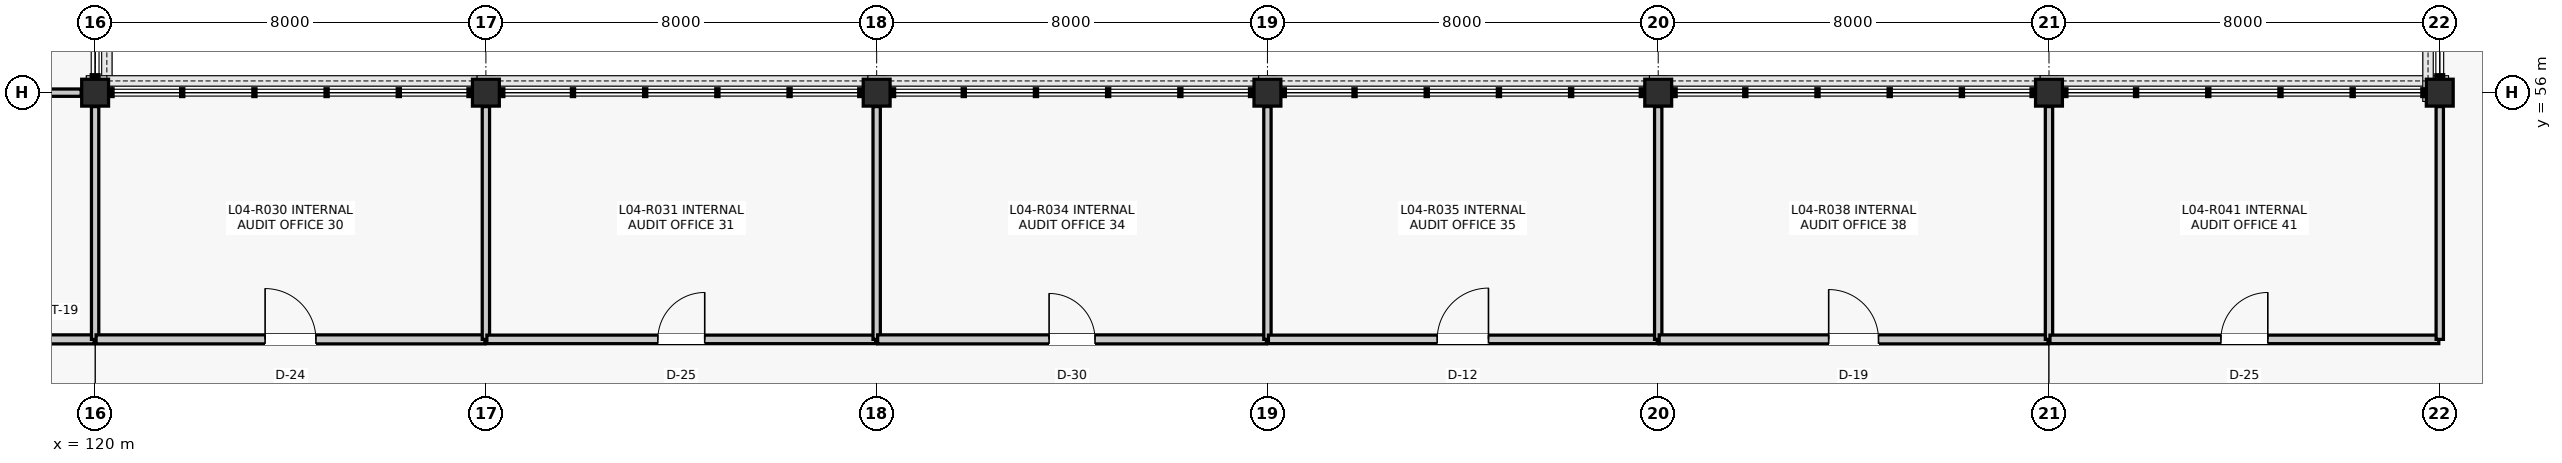
"""IFC4 building model, lengths in metres.
Left out: names, types, materials, properties, quantities, classifications, styles, units other than length and angle.
Written with IfcOpenShell. Run it as: python <this file> out.ifc"""

import sys

from ifc_helpers import new_model, si_unit, direction, frame, frame_2d, origin, origin_2d, place, context, subcontext, project, spatial, rectangle, extrude, element, fill, save


model = new_model("IFC4")
c1 = context("Model", 3, precision=1e-05, world=origin(), true_north=direction((0.0, 1.0)))
c2 = subcontext(c1, "Body", "Model", "MODEL_VIEW")
j1 = project(units=[si_unit("LENGTHUNIT", "METRE"), si_unit("PLANEANGLEUNIT", "RADIAN")], contexts=[c1])
p1 = place(None, origin())
s1 = spatial("IfcSite", under=j1, at=p1, CompositionType="ELEMENT")
p2 = place(p1, origin())
s2 = spatial("IfcBuilding", under=s1, at=p2, CompositionType="ELEMENT")
p3 = place(p2, frame((0.0, 0.0, 17.82)))
s3 = spatial("IfcBuildingStorey", under=s2, at=p3, CompositionType="ELEMENT", Elevation=17.82)
for number, where, z_axis, x_axis in (
    (1, (120.0, 56.0, 0.0), (0.0, 0.0, 1.0), (1.0, 0.0, 0.0)),
    (2, (128.0, 56.0, 0.0), (0.0, 0.0, 1.0), (1.0, 0.0, 0.0)),
    (3, (136.0, 56.0, 0.0), (0.0, 0.0, 1.0), (1.0, 0.0, 0.0)),
    (4, (144.0, 56.0, 0.0), (0.0, 0.0, 1.0), (1.0, 0.0, 0.0)),
    (5, (152.0, 56.0, 0.0), (0.0, 0.0, 1.0), (1.0, 0.0, 0.0)),
    (6, (160.0, 56.0, 0.0), (0.0, 0.0, 1.0), (1.0, 0.0, 0.0)),
    (7, (168.0, 56.0, 0.0), (0.0, 0.0, 1.0), (1.0, 0.0, 0.0)),
):
    element("IfcColumn", number, at=place(p3, frame(where, z_axis=z_axis, x_axis=x_axis)), inside=s3, PredefinedType="COLUMN", context=c2, shape_type="SweptSolid", body=[
        extrude(rectangle(XDim=0.55, YDim=0.55, at=origin_2d()), origin(), (0.0, 0.0, 1.0), 3.96),
    ])
p4 = place(p3, frame((114.9, 50.95, 0.0), z_axis=(0.0, 0.0, 1.0), x_axis=(1.0, 0.0, 0.0)))
e8 = element("IfcWall", 8, at=p4, inside=s3, PredefinedType="PARTITIONING", context=c2, shape_type="SweptSolid", body=[
    extrude(rectangle(XDim=5.08, YDim=0.185, at=frame_2d((2.54, 0.0))), origin(), (0.0, 0.0, 1.0), 3.232),
])
p5 = place(p4, frame((2.03, 0.0, 0.0)))
e9 = element("IfcOpeningElement", 9, at=p5, cuts=e8, PredefinedType="OPENING", context=c2, shape_type="SweptSolid", body=[
    extrude(rectangle(XDim=1.02, YDim=2.2, at=frame_2d((0.51, 1.1))), frame((0.0, 0.103, 0.0), z_axis=(0.0, -1.0, 0.0), x_axis=(1.0, 0.0, 0.0)), (0.0, 0.0, 1.0), 0.205),
])
p6 = place(p3, frame((114.95, 56.0, 0.0), z_axis=(0.0, 0.0, 1.0), x_axis=(1.0, 0.0, 0.0)))
e10 = element("IfcWall", 10, at=p6, inside=s3, PredefinedType="PARTITIONING", context=c2, shape_type="SweptSolid", body=[
    extrude(rectangle(XDim=4.765, YDim=0.15, at=frame_2d((2.383, 0.0))), origin(), (0.0, 0.0, 1.0), 3.238),
])
p7 = place(p3, frame((120.0, 50.95, 0.0), z_axis=(0.0, 0.0, 1.0), x_axis=(0.0, 1.0, 0.0)))
e11 = element("IfcWall", 11, at=p7, inside=s3, PredefinedType="PARTITIONING", context=c2, shape_type="SweptSolid", body=[
    extrude(rectangle(XDim=4.765, YDim=0.15, at=frame_2d((2.383, 0.0))), origin(), (0.0, 0.0, 1.0), 3.232),
])
p8 = place(p3, frame((120.02, 50.95, 0.0), z_axis=(0.0, 0.0, 1.0), x_axis=(1.0, 0.0, 0.0)))
e12 = element("IfcWall", 12, at=p8, inside=s3, PredefinedType="PARTITIONING", context=c2, shape_type="SweptSolid", body=[
    extrude(rectangle(XDim=7.96, YDim=0.185, at=frame_2d((3.98, 0.0))), origin(), (0.0, 0.0, 1.0), 3.232),
])
p9 = place(p8, frame((3.46, 0.0, 0.0)))
e13 = element("IfcOpeningElement", 13, at=p9, cuts=e12, PredefinedType="OPENING", context=c2, shape_type="SweptSolid", body=[
    extrude(rectangle(XDim=1.04, YDim=2.18, at=frame_2d((0.52, 1.09))), frame((0.0, 0.103, 0.0), z_axis=(0.0, -1.0, 0.0), x_axis=(1.0, 0.0, 0.0)), (0.0, 0.0, 1.0), 0.205),
])
p10 = place(p3, frame((128.0, 50.95, 0.0), z_axis=(0.0, 0.0, 1.0), x_axis=(0.0, 1.0, 0.0)))
e14 = element("IfcWall", 14, at=p10, inside=s3, PredefinedType="PARTITIONING", context=c2, shape_type="SweptSolid", body=[
    extrude(rectangle(XDim=4.765, YDim=0.15, at=frame_2d((2.383, 0.0))), origin(), (0.0, 0.0, 1.0), 3.238),
])
p11 = place(p3, frame((128.02, 50.95, 0.0), z_axis=(0.0, 0.0, 1.0), x_axis=(1.0, 0.0, 0.0)))
e15 = element("IfcWall", 15, at=p11, inside=s3, PredefinedType="PARTITIONING", context=c2, shape_type="SweptSolid", body=[
    extrude(rectangle(XDim=7.96, YDim=0.175, at=frame_2d((3.98, 0.0))), origin(), (0.0, 0.0, 1.0), 3.238),
])
p12 = place(p11, frame((3.5, 0.0, 0.0)))
e16 = element("IfcOpeningElement", 16, at=p12, cuts=e15, PredefinedType="OPENING", context=c2, shape_type="SweptSolid", body=[
    extrude(rectangle(XDim=0.96, YDim=2.14, at=frame_2d((0.48, 1.07))), frame((0.0, 0.097, 0.0), z_axis=(0.0, -1.0, 0.0), x_axis=(1.0, 0.0, 0.0)), (0.0, 0.0, 1.0), 0.195),
])
p13 = place(p3, frame((136.0, 50.95, 0.0), z_axis=(0.0, 0.0, 1.0), x_axis=(0.0, 1.0, 0.0)))
e17 = element("IfcWall", 17, at=p13, inside=s3, PredefinedType="PARTITIONING", context=c2, shape_type="SweptSolid", body=[
    extrude(rectangle(XDim=4.765, YDim=0.15, at=frame_2d((2.383, 0.0))), origin(), (0.0, 0.0, 1.0), 3.437),
])
p14 = place(p3, frame((136.02, 50.95, 0.0), z_axis=(0.0, 0.0, 1.0), x_axis=(1.0, 0.0, 0.0)))
e18 = element("IfcWall", 18, at=p14, inside=s3, PredefinedType="PARTITIONING", context=c2, shape_type="SweptSolid", body=[
    extrude(rectangle(XDim=7.96, YDim=0.185, at=frame_2d((3.98, 0.0))), origin(), (0.0, 0.0, 1.0), 3.232),
])
p15 = place(p14, frame((3.51, 0.0, 0.0)))
e19 = element("IfcOpeningElement", 19, at=p15, cuts=e18, PredefinedType="OPENING", context=c2, shape_type="SweptSolid", body=[
    extrude(rectangle(XDim=0.94, YDim=2.12, at=frame_2d((0.47, 1.06))), frame((0.0, 0.103, 0.0), z_axis=(0.0, -1.0, 0.0), x_axis=(1.0, 0.0, 0.0)), (0.0, 0.0, 1.0), 0.205),
])
p16 = place(p3, frame((144.0, 50.95, 0.0), z_axis=(0.0, 0.0, 1.0), x_axis=(0.0, 1.0, 0.0)))
e20 = element("IfcWall", 20, at=p16, inside=s3, PredefinedType="PARTITIONING", context=c2, shape_type="SweptSolid", body=[
    extrude(rectangle(XDim=4.765, YDim=0.15, at=frame_2d((2.383, 0.0))), origin(), (0.0, 0.0, 1.0), 3.232),
])
p17 = place(p3, frame((144.02, 50.95, 0.0), z_axis=(0.0, 0.0, 1.0), x_axis=(1.0, 0.0, 0.0)))
e21 = element("IfcWall", 21, at=p17, inside=s3, PredefinedType="PARTITIONING", context=c2, shape_type="SweptSolid", body=[
    extrude(rectangle(XDim=7.96, YDim=0.175, at=frame_2d((3.98, 0.0))), origin(), (0.0, 0.0, 1.0), 3.232),
])
p18 = place(p17, frame((3.455, 0.0, 0.0)))
e22 = element("IfcOpeningElement", 22, at=p18, cuts=e21, PredefinedType="OPENING", context=c2, shape_type="SweptSolid", body=[
    extrude(rectangle(XDim=1.05, YDim=2.15, at=frame_2d((0.525, 1.075))), frame((0.0, 0.097, 0.0), z_axis=(0.0, -1.0, 0.0), x_axis=(1.0, 0.0, 0.0)), (0.0, 0.0, 1.0), 0.195),
])
p19 = place(p3, frame((152.0, 50.95, 0.0), z_axis=(0.0, 0.0, 1.0), x_axis=(0.0, 1.0, 0.0)))
e23 = element("IfcWall", 23, at=p19, inside=s3, PredefinedType="PARTITIONING", context=c2, shape_type="SweptSolid", body=[
    extrude(rectangle(XDim=4.765, YDim=0.15, at=frame_2d((2.383, 0.0))), origin(), (0.0, 0.0, 1.0), 3.238),
])
p20 = place(p3, frame((152.02, 50.95, 0.0), z_axis=(0.0, 0.0, 1.0), x_axis=(1.0, 0.0, 0.0)))
e24 = element("IfcWall", 24, at=p20, inside=s3, PredefinedType="PARTITIONING", context=c2, shape_type="SweptSolid", body=[
    extrude(rectangle(XDim=7.96, YDim=0.185, at=frame_2d((3.98, 0.0))), origin(), (0.0, 0.0, 1.0), 3.238),
])
p21 = place(p20, frame((3.47, 0.0, 0.0)))
e25 = element("IfcOpeningElement", 25, at=p21, cuts=e24, PredefinedType="OPENING", context=c2, shape_type="SweptSolid", body=[
    extrude(rectangle(XDim=1.02, YDim=2.2, at=frame_2d((0.51, 1.1))), frame((0.0, 0.103, 0.0), z_axis=(0.0, -1.0, 0.0), x_axis=(1.0, 0.0, 0.0)), (0.0, 0.0, 1.0), 0.205),
])
p22 = place(p3, frame((160.0, 50.95, 0.0), z_axis=(0.0, 0.0, 1.0), x_axis=(0.0, 1.0, 0.0)))
e26 = element("IfcWall", 26, at=p22, inside=s3, PredefinedType="PARTITIONING", context=c2, shape_type="SweptSolid", body=[
    extrude(rectangle(XDim=4.765, YDim=0.15, at=frame_2d((2.383, 0.0))), origin(), (0.0, 0.0, 1.0), 3.437),
])
p23 = place(p3, frame((160.02, 50.95, 0.0), z_axis=(0.0, 0.0, 1.0), x_axis=(1.0, 0.0, 0.0)))
e27 = element("IfcWall", 27, at=p23, inside=s3, PredefinedType="PARTITIONING", context=c2, shape_type="SweptSolid", body=[
    extrude(rectangle(XDim=7.96, YDim=0.175, at=frame_2d((3.98, 0.0))), origin(), (0.0, 0.0, 1.0), 3.232),
])
p24 = place(p23, frame((3.5, 0.0, 0.0)))
e28 = element("IfcOpeningElement", 28, at=p24, cuts=e27, PredefinedType="OPENING", context=c2, shape_type="SweptSolid", body=[
    extrude(rectangle(XDim=0.96, YDim=2.14, at=frame_2d((0.48, 1.07))), frame((0.0, 0.097, 0.0), z_axis=(0.0, -1.0, 0.0), x_axis=(1.0, 0.0, 0.0)), (0.0, 0.0, 1.0), 0.195),
])
p25 = place(p3, frame((168.0, 50.95, 0.0), z_axis=(0.0, 0.0, 1.0), x_axis=(0.0, 1.0, 0.0)))
e29 = element("IfcWall", 29, at=p25, inside=s3, PredefinedType="PARTITIONING", context=c2, shape_type="SweptSolid", body=[
    extrude(rectangle(XDim=4.765, YDim=0.15, at=frame_2d((2.383, 0.0))), origin(), (0.0, 0.0, 1.0), 3.232),
])
p26 = place(p9, origin())
e30 = element("IfcDoor", 30, at=p26, inside=s3, OperationType="SINGLE_SWING_LEFT", PredefinedType="DOOR", context=c2, shape_type="SweptSolid", body=[
    extrude(rectangle(XDim=1.04, YDim=2.18, at=frame_2d((0.52, 1.09))), frame((0.0, 0.025, 0.0), z_axis=(0.0, -1.0, 0.0), x_axis=(1.0, 0.0, 0.0)), (0.0, 0.0, 1.0), 0.05),
])
fill(e13, e30)
p27 = place(p12, origin())
e31 = element("IfcDoor", 31, at=p27, inside=s3, OperationType="SINGLE_SWING_RIGHT", PredefinedType="DOOR", context=c2, shape_type="SweptSolid", body=[
    extrude(rectangle(XDim=0.96, YDim=2.14, at=frame_2d((0.48, 1.07))), frame((0.0, 0.025, 0.0), z_axis=(0.0, -1.0, 0.0), x_axis=(1.0, 0.0, 0.0)), (0.0, 0.0, 1.0), 0.05),
])
fill(e16, e31)
p28 = place(p15, origin())
e32 = element("IfcDoor", 32, at=p28, inside=s3, OperationType="SINGLE_SWING_LEFT", PredefinedType="DOOR", context=c2, shape_type="SweptSolid", body=[
    extrude(rectangle(XDim=0.94, YDim=2.12, at=frame_2d((0.47, 1.06))), frame((0.0, 0.025, 0.0), z_axis=(0.0, -1.0, 0.0), x_axis=(1.0, 0.0, 0.0)), (0.0, 0.0, 1.0), 0.05),
])
fill(e19, e32)
p29 = place(p18, origin())
e33 = element("IfcDoor", 33, at=p29, inside=s3, OperationType="SINGLE_SWING_RIGHT", PredefinedType="DOOR", context=c2, shape_type="SweptSolid", body=[
    extrude(rectangle(XDim=1.05, YDim=2.15, at=frame_2d((0.525, 1.075))), frame((0.0, 0.025, 0.0), z_axis=(0.0, -1.0, 0.0), x_axis=(1.0, 0.0, 0.0)), (0.0, 0.0, 1.0), 0.05),
])
fill(e22, e33)
p30 = place(p21, origin())
e34 = element("IfcDoor", 34, at=p30, inside=s3, OperationType="SINGLE_SWING_LEFT", PredefinedType="DOOR", context=c2, shape_type="SweptSolid", body=[
    extrude(rectangle(XDim=1.02, YDim=2.2, at=frame_2d((0.51, 1.1))), frame((0.0, 0.025, 0.0), z_axis=(0.0, -1.0, 0.0), x_axis=(1.0, 0.0, 0.0)), (0.0, 0.0, 1.0), 0.05),
])
fill(e25, e34)
p31 = place(p24, origin())
e35 = element("IfcDoor", 35, at=p31, inside=s3, OperationType="SINGLE_SWING_RIGHT", PredefinedType="DOOR", context=c2, shape_type="SweptSolid", body=[
    extrude(rectangle(XDim=0.96, YDim=2.14, at=frame_2d((0.48, 1.07))), frame((0.0, 0.025, 0.0), z_axis=(0.0, -1.0, 0.0), x_axis=(1.0, 0.0, 0.0)), (0.0, 0.0, 1.0), 0.05),
])
fill(e28, e35)
save(model, sys.argv[1])
